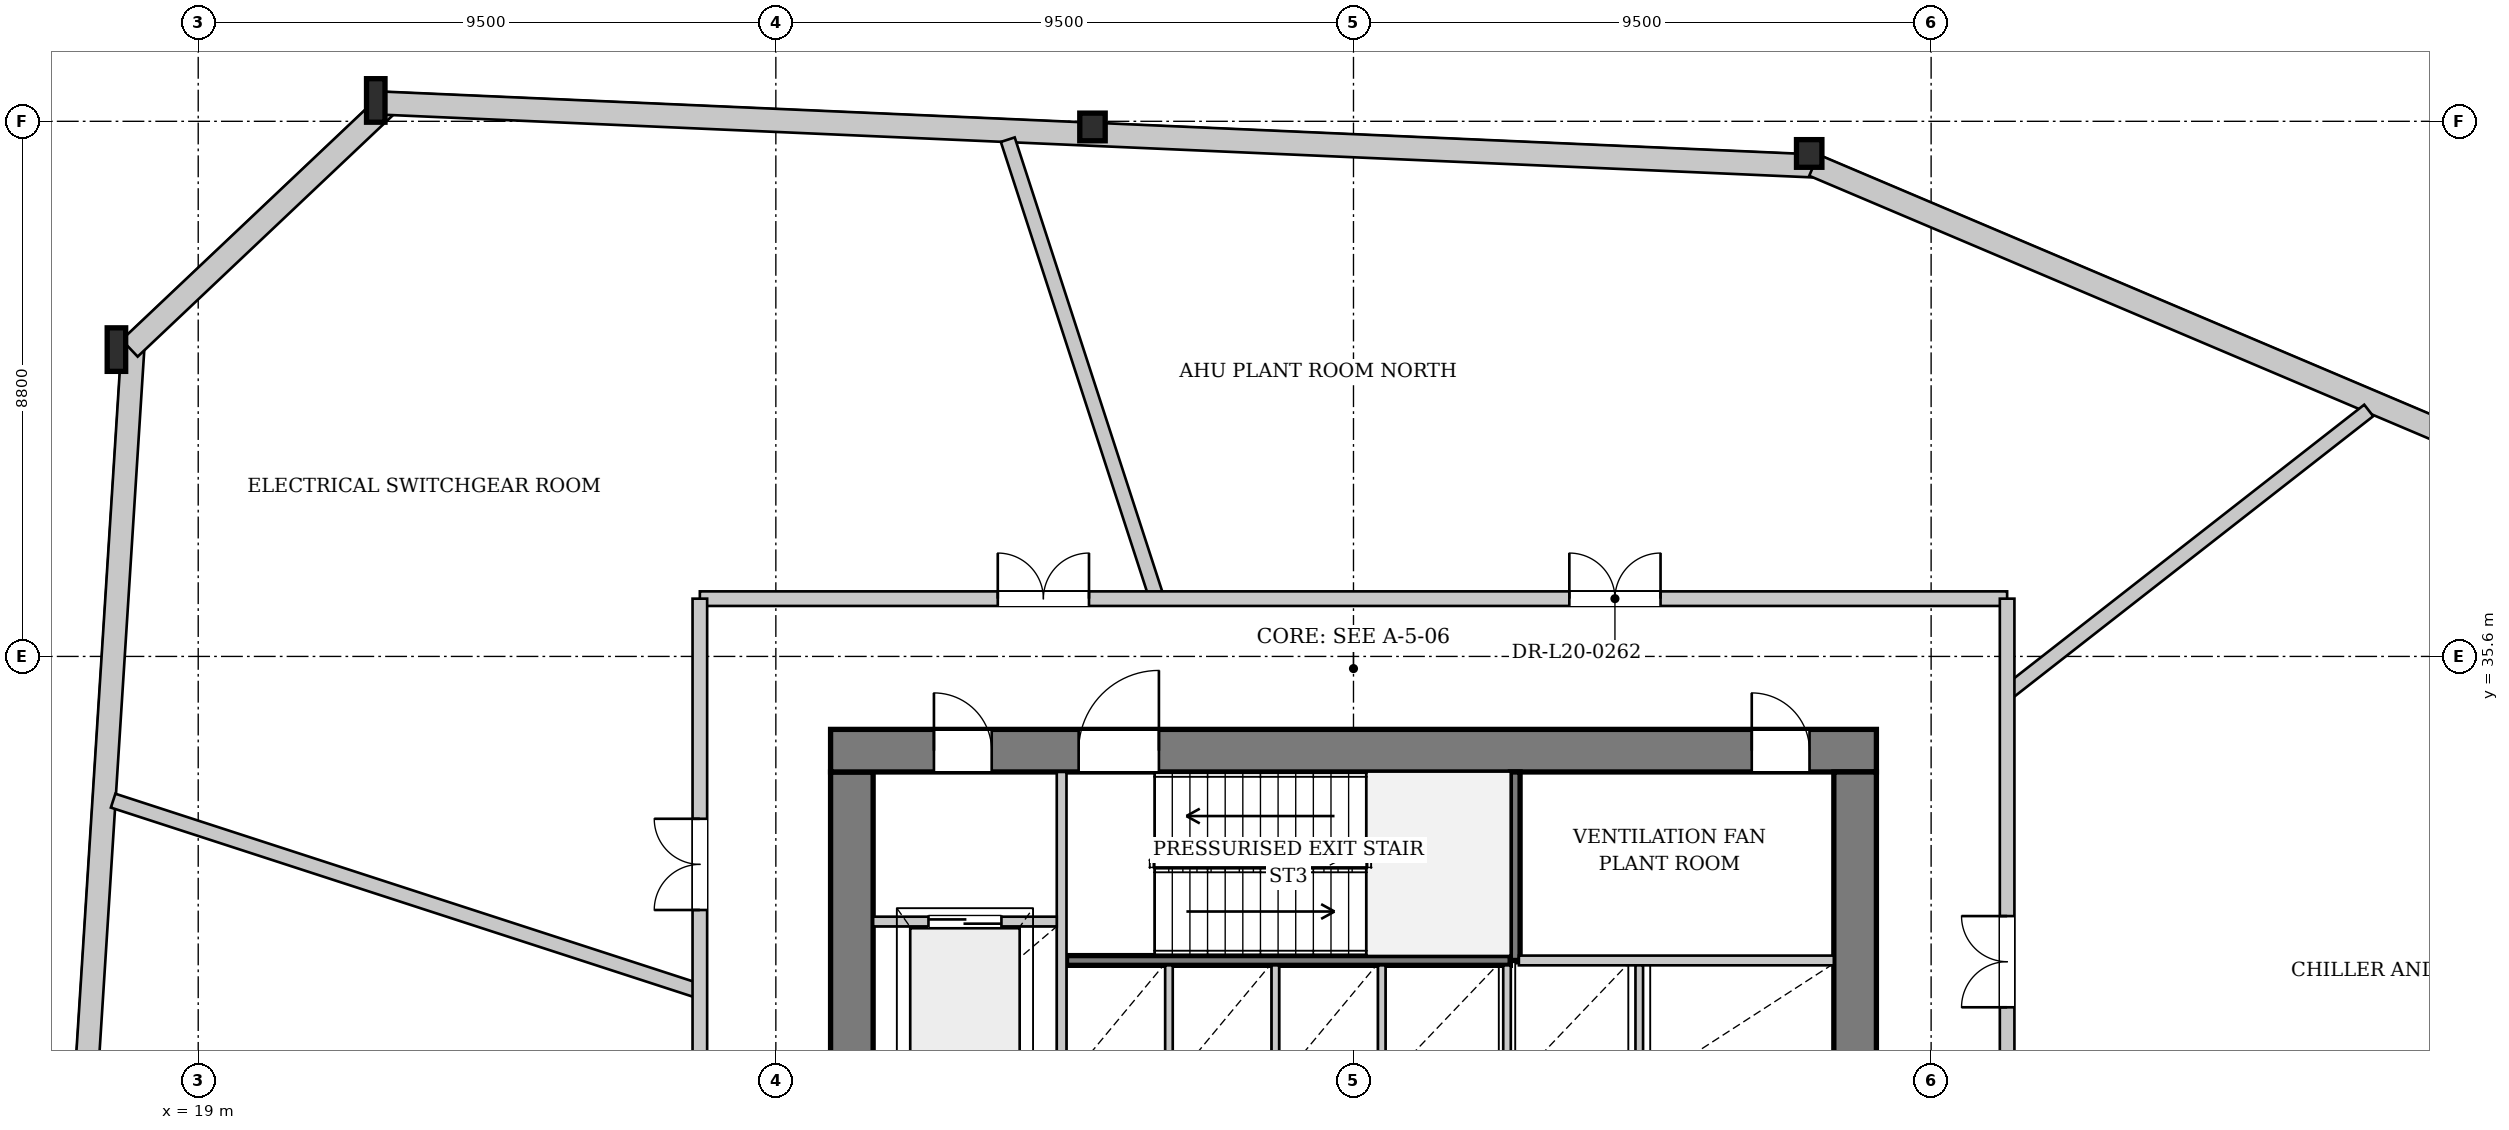
"""IFC4 building model, lengths in metres.
Left out: names, types, materials, properties, quantities, classifications, styles, units other than length and angle.
Written with IfcOpenShell. Run it as: python <this file> out.ifc"""

import sys

from ifc_helpers import new_model, si_unit, direction, frame, frame_2d, origin, origin_2d, place, context, subcontext, project, spatial, rectangle, i_section, extrude, source, transform, mapped, element, fill, save


model = new_model("IFC4")
c1 = context("Model", 3, precision=1e-05, world=origin(), true_north=direction((0.0, 1.0)))
c2 = subcontext(c1, "Body", "Model", "MODEL_VIEW")
j1 = project(units=[si_unit("LENGTHUNIT", "METRE"), si_unit("PLANEANGLEUNIT", "RADIAN")], contexts=[c1])
p1 = place(None, origin())
s1 = spatial("IfcSite", under=j1, at=p1, CompositionType="ELEMENT")
p2 = place(p1, origin())
s2 = spatial("IfcBuilding", under=s1, at=p2, CompositionType="ELEMENT")
p3 = place(p2, frame((0.0, 0.0, 79.9)))
s3 = spatial("IfcBuildingStorey", under=s2, at=p3, CompositionType="ELEMENT", Elevation=79.9)
m1 = source(origin(), c2, "Body", "SweptSolid", [
    extrude(i_section(OverallWidth=0.418, OverallDepth=0.455, WebThickness=0.038, FlangeThickness=0.059, at=origin_2d()), origin(), (0.0, 0.0, 1.0), 4.346),
])
p4 = place(p3, frame((45.644, 43.854, 0.0), z_axis=(-0.068709156134, 0.008202401305, 0.997603013466), x_axis=(-0.118536916042, -0.992949646022, 0.0)))
e1 = element("IfcColumn", 1, at=p4, inside=s3, PredefinedType="COLUMN", context=c2, shape_type="MappedRepresentation", body=[
    mapped(m1, transform((0.0, 0.0, 0.0), x_axis=(1.0, 0.0, 0.0), y_axis=(0.0, 1.0, 0.0), z_axis=(0.0, 0.0, 1.0), scale=1.0)),
])
m2 = source(origin(), c2, "Body", "SweptSolid", [
    extrude(i_section(OverallWidth=0.418, OverallDepth=0.455, WebThickness=0.038, FlangeThickness=0.059, at=origin_2d()), origin(), (0.0, 0.0, 1.0), 4.347),
])
p5 = place(p3, frame((33.852, 44.371, 0.0), z_axis=(-0.066389650147, -0.029375454338, 0.997361267062), x_axis=(0.40463044946, -0.914480289219, 0.0)))
e2 = element("IfcColumn", 2, at=p5, inside=s3, PredefinedType="COLUMN", context=c2, shape_type="MappedRepresentation", body=[
    mapped(m2, transform((0.0, 0.0, 0.0), x_axis=(1.0, 0.0, 0.0), y_axis=(0.0, 1.0, 0.0), z_axis=(0.0, 0.0, 1.0), scale=1.0)),
])
m3 = source(origin(), c2, "Body", "SweptSolid", [
    extrude(i_section(OverallWidth=0.304, OverallDepth=0.716, WebThickness=0.021, FlangeThickness=0.04, at=origin_2d()), origin(), (0.0, 0.0, 1.0), 4.354),
])
p6 = place(p3, frame((22.059, 44.888, 0.0), z_axis=(-0.06398118245, -0.066728840592, 0.99571766587), x_axis=(0.721811427095, -0.692089780097, 0.0)))
e3 = element("IfcColumn", 3, at=p6, inside=s3, PredefinedType="COLUMN", context=c2, shape_type="MappedRepresentation", body=[
    mapped(m3, transform((0.0, 0.0, 0.0), x_axis=(1.0, 0.0, 0.0), y_axis=(0.0, 1.0, 0.0), z_axis=(0.0, 0.0, 1.0), scale=1.0)),
])
m4 = source(origin(), c2, "Body", "SweptSolid", [
    extrude(i_section(OverallWidth=0.304, OverallDepth=0.716, WebThickness=0.021, FlangeThickness=0.04, at=origin_2d()), origin(), (0.0, 0.0, 1.0), 4.351),
])
p7 = place(p3, frame((17.743, 40.806, 0.0), z_axis=(-0.040459833121, -0.073736783246, 0.996456666745), x_axis=(0.876694422184, -0.481047700453, 0.0)))
e4 = element("IfcColumn", 4, at=p7, inside=s3, PredefinedType="COLUMN", context=c2, shape_type="MappedRepresentation", body=[
    mapped(m4, transform((0.0, 0.0, 0.0), x_axis=(1.0, 0.0, 0.0), y_axis=(0.0, 1.0, 0.0), z_axis=(0.0, 0.0, 1.0), scale=1.0)),
])
p8 = place(p3, frame((16.764, 22.462, 0.0), z_axis=(0.0, 0.0, 1.0), x_axis=(0.063622704695, 0.997974023433, 0.0)))
e5 = element("IfcWall", 5, at=p8, inside=s3, PredefinedType="SOLIDWALL", context=c2, shape_type="SweptSolid", body=[
    extrude(rectangle(XDim=18.369, YDim=0.38, at=frame_2d((9.185, 0.0))), origin(), (0.0, 0.0, 1.0), 3.642),
])
p9 = place(p3, frame((17.874, 40.668, 0.0), z_axis=(0.0, 0.0, 1.0), x_axis=(0.726536612443, 0.687127754336, 0.0)))
e6 = element("IfcWall", 6, at=p9, inside=s3, PredefinedType="SOLIDWALL", context=c2, shape_type="SweptSolid", body=[
    extrude(rectangle(XDim=5.941, YDim=0.38, at=frame_2d((2.971, 0.0))), origin(), (0.0, 0.0, 1.0), 3.642),
])
p10 = place(p3, frame((22.051, 44.698, 0.0), z_axis=(0.0, 0.0, 1.0), x_axis=(0.999039086375, -0.043828117637, 0.0)))
e7 = element("IfcWall", 7, at=p10, inside=s3, PredefinedType="SOLIDWALL", context=c2, shape_type="SweptSolid", body=[
    extrude(rectangle(XDim=23.607, YDim=0.38, at=frame_2d((11.804, 0.0))), origin(), (0.0, 0.0, 1.0), 3.642),
])
p11 = place(p3, frame((45.57, 43.679, 0.0), z_axis=(0.0, 0.0, 1.0), x_axis=(0.920635630861, -0.390422892758, 0.0)))
e8 = element("IfcWall", 8, at=p11, inside=s3, PredefinedType="SOLIDWALL", context=c2, shape_type="SweptSolid", body=[
    extrude(rectangle(XDim=23.607, YDim=0.38, at=frame_2d((11.804, 0.0))), origin(), (0.0, 0.0, 1.0), 3.642),
])
p12 = place(p3, frame((68.059, 30.563, 0.0), z_axis=(0.0, 0.0, 1.0), x_axis=(-0.711738982303, -0.70244403412, 0.0)))
e9 = element("IfcWall", 9, at=p12, inside=s3, PredefinedType="SOLIDWALL", context=c2, shape_type="SweptSolid", body=[
    extrude(rectangle(XDim=24.217, YDim=0.38, at=frame_2d((12.109, 0.0))), origin(), (0.0, 0.0, 1.0), 3.642),
])
p13 = place(p3, frame((29.75, 19.5, 0.0), z_axis=(0.0, 0.0, 1.0), x_axis=(0.0, 1.0, 0.0)))
e10 = element("IfcWall", 10, at=p13, inside=s3, PredefinedType="SHEAR", context=c2, shape_type="SweptSolid", body=[
    extrude(rectangle(XDim=14.2, YDim=0.7, at=frame_2d((7.1, 0.0))), origin(), (0.0, 0.0, 1.0), 4.25),
])
p14 = place(p13, frame((7.42, 0.0, 0.0)))
e11 = element("IfcOpeningElement", 11, at=p14, cuts=e10, PredefinedType="OPENING", context=c2, shape_type="SweptSolid", body=[
    extrude(rectangle(XDim=1.6, YDim=2.2, at=frame_2d((0.8, 1.1))), frame((0.0, 0.36, 0.0), z_axis=(0.0, -1.0, 0.0), x_axis=(1.0, 0.0, 0.0)), (0.0, 0.0, 1.0), 0.72),
])
p15 = place(p3, frame((29.4, 34.05, 0.0), z_axis=(0.0, 0.0, 1.0), x_axis=(1.0, 0.0, 0.0)))
e12 = element("IfcWall", 12, at=p15, inside=s3, PredefinedType="SHEAR", context=c2, shape_type="SweptSolid", body=[
    extrude(rectangle(XDim=17.2, YDim=0.7, at=frame_2d((8.6, 0.0))), origin(), (0.0, 0.0, 1.0), 4.25),
])
p16 = place(p15, frame((1.7, 0.0, 0.0)))
e13 = element("IfcOpeningElement", 13, at=p16, cuts=e12, PredefinedType="OPENING", context=c2, shape_type="SweptSolid", body=[
    extrude(rectangle(XDim=0.95, YDim=2.1, at=frame_2d((0.475, 1.05))), frame((0.0, 0.36, 0.0), z_axis=(0.0, -1.0, 0.0), x_axis=(1.0, 0.0, 0.0)), (0.0, 0.0, 1.0), 0.72),
])
p17 = place(p15, frame((4.08, 0.0, 0.0)))
e14 = element("IfcOpeningElement", 14, at=p17, cuts=e12, PredefinedType="OPENING", context=c2, shape_type="SweptSolid", body=[
    extrude(rectangle(XDim=1.32, YDim=2.2, at=frame_2d((0.66, 1.1))), frame((0.0, 0.36, 0.0), z_axis=(0.0, -1.0, 0.0), x_axis=(1.0, 0.0, 0.0)), (0.0, 0.0, 1.0), 0.72),
])
p18 = place(p15, frame((15.15, 0.0, 0.0)))
e15 = element("IfcOpeningElement", 15, at=p18, cuts=e12, PredefinedType="OPENING", context=c2, shape_type="SweptSolid", body=[
    extrude(rectangle(XDim=0.95, YDim=2.1, at=frame_2d((0.475, 1.05))), frame((0.0, 0.36, 0.0), z_axis=(0.0, -1.0, 0.0), x_axis=(1.0, 0.0, 0.0)), (0.0, 0.0, 1.0), 0.72),
])
p19 = place(p3, frame((46.25, 33.7, 0.0), z_axis=(0.0, 0.0, 1.0), x_axis=(0.0, -1.0, 0.0)))
e16 = element("IfcWall", 16, at=p19, inside=s3, PredefinedType="SHEAR", context=c2, shape_type="SweptSolid", body=[
    extrude(rectangle(XDim=14.2, YDim=0.7, at=frame_2d((7.1, 0.0))), origin(), (0.0, 0.0, 1.0), 4.25),
])
p20 = place(p19, frame((5.18, 0.0, 0.0)))
e17 = element("IfcOpeningElement", 17, at=p20, cuts=e16, PredefinedType="OPENING", context=c2, shape_type="SweptSolid", body=[
    extrude(rectangle(XDim=1.6, YDim=2.2, at=frame_2d((0.8, 1.1))), frame((0.0, 0.36, 0.0), z_axis=(0.0, -1.0, 0.0), x_axis=(1.0, 0.0, 0.0)), (0.0, 0.0, 1.0), 0.72),
])
p21 = place(p3, frame((33.28, 30.6, 0.0), z_axis=(0.0, 0.0, 1.0), x_axis=(1.0, 0.0, 0.0)))
e18 = element("IfcWall", 18, at=p21, inside=s3, PredefinedType="PARTITIONING", context=c2, shape_type="SweptSolid", body=[
    extrude(rectangle(XDim=7.3, YDim=0.16, at=frame_2d((3.65, 0.0))), origin(), (0.0, 0.0, 1.0), 4.25),
])
p22 = place(p3, frame((40.66, 30.6, 0.0), z_axis=(0.0, 0.0, 1.0), x_axis=(0.0, 1.0, 0.0)))
e19 = element("IfcWall", 19, at=p22, inside=s3, PredefinedType="PARTITIONING", context=c2, shape_type="SweptSolid", body=[
    extrude(rectangle(XDim=3.1, YDim=0.16, at=frame_2d((1.55, 0.0))), origin(), (0.0, 0.0, 1.0), 4.25),
])
p23 = place(p3, frame((33.2, 28.44, 0.0), z_axis=(0.0, 0.0, 1.0), x_axis=(0.0, 1.0, 0.0)))
e20 = element("IfcWall", 20, at=p23, inside=s3, PredefinedType="PARTITIONING", context=c2, shape_type="SweptSolid", body=[
    extrude(rectangle(XDim=5.26, YDim=0.16, at=frame_2d((2.63, 0.0))), origin(), (0.0, 0.0, 1.0), 4.25),
])
p24 = place(p3, frame((30.1, 31.24, 0.0), z_axis=(0.0, 0.0, 1.0), x_axis=(1.0, 0.0, 0.0)))
e21 = element("IfcWall", 21, at=p24, inside=s3, PredefinedType="PARTITIONING", context=c2, shape_type="SweptSolid", body=[
    extrude(rectangle(XDim=3.02, YDim=0.16, at=frame_2d((1.51, 0.0))), origin(), (0.0, 0.0, 1.0), 4.25),
])
p25 = place(p24, frame((0.91, 0.0, 0.0)))
e22 = element("IfcOpeningElement", 22, at=p25, cuts=e21, PredefinedType="OPENING", context=c2, shape_type="SweptSolid", body=[
    extrude(rectangle(XDim=1.2, YDim=2.2, at=frame_2d((0.6, 1.1))), frame((0.0, 0.09, 0.0), z_axis=(0.0, -1.0, 0.0), x_axis=(1.0, 0.0, 0.0)), (0.0, 0.0, 1.0), 0.18),
])
p26 = place(p3, frame((40.72, 30.6, 0.0), z_axis=(0.0, 0.0, 1.0), x_axis=(1.0, 0.0, 0.0)))
e23 = element("IfcWall", 23, at=p26, inside=s3, PredefinedType="PARTITIONING", context=c2, shape_type="SweptSolid", body=[
    extrude(rectangle(XDim=5.18, YDim=0.16, at=frame_2d((2.59, 0.0))), origin(), (0.0, 0.0, 1.0), 4.25),
])
for number, where, z_axis, x_axis in (
    (24, (34.965, 28.6, 0.0), (0.0, 0.0, 1.0), (0.0, 1.0, 0.0)),
    (25, (36.715, 28.6, 0.0), (0.0, 0.0, 1.0), (0.0, 1.0, 0.0)),
    (26, (38.465, 28.6, 0.0), (0.0, 0.0, 1.0), (0.0, 1.0, 0.0)),
    (27, (40.525, 28.6, 0.0), (0.0, 0.0, 1.0), (0.0, 1.0, 0.0)),
    (28, (42.7, 28.6, 0.0), (0.0, 0.0, 1.0), (0.0, 1.0, 0.0)),
):
    element("IfcWall", number, at=place(p3, frame(where, z_axis=z_axis, x_axis=x_axis)), inside=s3, PredefinedType="PARTITIONING", context=c2, shape_type="SweptSolid", body=[
        extrude(rectangle(XDim=1.92, YDim=0.125, at=frame_2d((0.96, 0.0))), origin(), (0.0, 0.0, 1.0), 4.25),
    ])
p27 = place(p3, frame((48.75, 34.999, 0.0), z_axis=(0.0, 0.0, 1.0), x_axis=(0.788016035998, 0.615654714113, 0.0)))
e29 = element("IfcWall", 29, at=p27, inside=s3, PredefinedType="PARTITIONING", context=c2, shape_type="SweptSolid", body=[
    extrude(rectangle(XDim=7.547, YDim=0.24, at=frame_2d((3.773, 0.0))), origin(), (0.0, 0.0, 1.0), 4.25),
])
p28 = place(p3, frame((34.767, 36.55, 0.0), z_axis=(0.0, 0.0, 1.0), x_axis=(-0.309029730832, 0.951052377875, 0.0)))
e30 = element("IfcWall", 30, at=p28, inside=s3, PredefinedType="PARTITIONING", context=c2, shape_type="SweptSolid", body=[
    extrude(rectangle(XDim=7.937, YDim=0.24, at=frame_2d((3.968, 0.0))), origin(), (0.0, 0.0, 1.0), 4.25),
])
p29 = place(p3, frame((27.25, 30.093, 0.0), z_axis=(0.0, 0.0, 1.0), x_axis=(-0.95105740787, 0.309014250376, 0.0)))
e31 = element("IfcWall", 31, at=p29, inside=s3, PredefinedType="PARTITIONING", context=c2, shape_type="SweptSolid", body=[
    extrude(rectangle(XDim=10.146, YDim=0.24, at=frame_2d((5.073, 0.0))), origin(), (0.0, 0.0, 1.0), 4.25),
])
p30 = place(p3, frame((27.25, 36.55, 0.0), z_axis=(0.0, 0.0, 1.0), x_axis=(1.0, 0.0, 0.0)))
e32 = element("IfcWall", 32, at=p30, inside=s3, PredefinedType="PARTITIONING", context=c2, shape_type="SweptSolid", body=[
    extrude(rectangle(XDim=21.5, YDim=0.24, at=frame_2d((10.75, 0.0))), origin(), (0.0, 0.0, 1.0), 4.25),
])
p31 = place(p30, frame((4.9, 0.0, 0.0)))
e33 = element("IfcOpeningElement", 33, at=p31, cuts=e32, PredefinedType="OPENING", context=c2, shape_type="SweptSolid", body=[
    extrude(rectangle(XDim=1.5, YDim=2.25, at=frame_2d((0.75, 1.125))), frame((0.0, 0.13, 0.0), z_axis=(0.0, -1.0, 0.0), x_axis=(1.0, 0.0, 0.0)), (0.0, 0.0, 1.0), 0.26),
])
p32 = place(p30, frame((14.3, 0.0, 0.0)))
e34 = element("IfcOpeningElement", 34, at=p32, cuts=e32, PredefinedType="OPENING", context=c2, shape_type="SweptSolid", body=[
    extrude(rectangle(XDim=1.5, YDim=2.25, at=frame_2d((0.75, 1.125))), frame((0.0, 0.13, 0.0), z_axis=(0.0, -1.0, 0.0), x_axis=(1.0, 0.0, 0.0)), (0.0, 0.0, 1.0), 0.26),
])
p33 = place(p3, frame((27.25, 16.65, 0.0), z_axis=(0.0, 0.0, 1.0), x_axis=(0.0, 1.0, 0.0)))
e35 = element("IfcWall", 35, at=p33, inside=s3, PredefinedType="PARTITIONING", context=c2, shape_type="SweptSolid", body=[
    extrude(rectangle(XDim=19.9, YDim=0.24, at=frame_2d((9.95, 0.0))), origin(), (0.0, 0.0, 1.0), 4.25),
])
p34 = place(p33, frame((5.22, 0.0, 0.0)))
e36 = element("IfcOpeningElement", 36, at=p34, cuts=e35, PredefinedType="OPENING", context=c2, shape_type="SweptSolid", body=[
    extrude(rectangle(XDim=1.5, YDim=2.25, at=frame_2d((0.75, 1.125))), frame((0.0, 0.13, 0.0), z_axis=(0.0, -1.0, 0.0), x_axis=(1.0, 0.0, 0.0)), (0.0, 0.0, 1.0), 0.26),
])
p35 = place(p33, frame((14.78, 0.0, 0.0)))
e37 = element("IfcOpeningElement", 37, at=p35, cuts=e35, PredefinedType="OPENING", context=c2, shape_type="SweptSolid", body=[
    extrude(rectangle(XDim=1.5, YDim=2.25, at=frame_2d((0.75, 1.125))), frame((0.0, 0.13, 0.0), z_axis=(0.0, -1.0, 0.0), x_axis=(1.0, 0.0, 0.0)), (0.0, 0.0, 1.0), 0.26),
])
p36 = place(p3, frame((48.75, 16.65, 0.0), z_axis=(0.0, 0.0, 1.0), x_axis=(0.0, 1.0, 0.0)))
e38 = element("IfcWall", 38, at=p36, inside=s3, PredefinedType="PARTITIONING", context=c2, shape_type="SweptSolid", body=[
    extrude(rectangle(XDim=19.9, YDim=0.24, at=frame_2d((9.95, 0.0))), origin(), (0.0, 0.0, 1.0), 4.25),
])
p37 = place(p36, frame((5.22, 0.0, 0.0)))
e39 = element("IfcOpeningElement", 39, at=p37, cuts=e38, PredefinedType="OPENING", context=c2, shape_type="SweptSolid", body=[
    extrude(rectangle(XDim=1.5, YDim=2.25, at=frame_2d((0.75, 1.125))), frame((0.0, 0.13, 0.0), z_axis=(0.0, -1.0, 0.0), x_axis=(1.0, 0.0, 0.0)), (0.0, 0.0, 1.0), 0.26),
])
p38 = place(p36, frame((13.18, 0.0, 0.0)))
e40 = element("IfcOpeningElement", 40, at=p38, cuts=e38, PredefinedType="OPENING", context=c2, shape_type="SweptSolid", body=[
    extrude(rectangle(XDim=1.5, YDim=2.25, at=frame_2d((0.75, 1.125))), frame((0.0, 0.13, 0.0), z_axis=(0.0, -1.0, 0.0), x_axis=(1.0, 0.0, 0.0)), (0.0, 0.0, 1.0), 0.26),
])
m5 = source(origin(), c2, "Body", "SweptSolid", [
    extrude(rectangle(XDim=0.95, YDim=2.1, at=frame_2d((0.475, 1.05))), frame((0.0, 0.025, 0.0), z_axis=(0.0, -1.0, 0.0), x_axis=(1.0, 0.0, 0.0)), (0.0, 0.0, 1.0), 0.05),
])
p39 = place(p16, origin())
e41 = element("IfcDoor", 41, at=p39, inside=s3, OperationType="SINGLE_SWING_LEFT", PredefinedType="DOOR", context=c2, shape_type="MappedRepresentation", body=[
    mapped(m5, transform((0.0, 0.0, 0.0), x_axis=(1.0, 0.0, 0.0), y_axis=(0.0, 1.0, 0.0), z_axis=(0.0, 0.0, 1.0), scale=1.0)),
])
fill(e13, e41)
m6 = source(origin(), c2, "Body", "SweptSolid", [
    extrude(rectangle(XDim=1.32, YDim=2.2, at=frame_2d((0.66, 1.1))), frame((0.0, 0.025, 0.0), z_axis=(0.0, -1.0, 0.0), x_axis=(1.0, 0.0, 0.0)), (0.0, 0.0, 1.0), 0.05),
])
p40 = place(p17, origin())
e42 = element("IfcDoor", 42, at=p40, inside=s3, OperationType="SINGLE_SWING_RIGHT", PredefinedType="DOOR", context=c2, shape_type="MappedRepresentation", body=[
    mapped(m6, transform((0.0, 0.0, 0.0), x_axis=(1.0, 0.0, 0.0), y_axis=(0.0, 1.0, 0.0), z_axis=(0.0, 0.0, 1.0), scale=1.0)),
])
fill(e14, e42)
m7 = source(origin(), c2, "Body", "SweptSolid", [
    extrude(rectangle(XDim=1.2, YDim=2.2, at=frame_2d((0.6, 1.1))), frame((0.0, 0.025, 0.0), z_axis=(0.0, -1.0, 0.0), x_axis=(1.0, 0.0, 0.0)), (0.0, 0.0, 1.0), 0.05),
])
p41 = place(p25, origin())
e43 = element("IfcDoor", 43, at=p41, inside=s3, OperationType="DOUBLE_DOOR_SLIDING", PredefinedType="DOOR", context=c2, shape_type="MappedRepresentation", body=[
    mapped(m7, transform((0.0, 0.0, 0.0), x_axis=(1.0, 0.0, 0.0), y_axis=(0.0, 1.0, 0.0), z_axis=(0.0, 0.0, 1.0), scale=1.0)),
])
fill(e22, e43)
p42 = place(p18, origin())
e44 = element("IfcDoor", 44, at=p42, inside=s3, OperationType="SINGLE_SWING_LEFT", PredefinedType="DOOR", context=c2, shape_type="MappedRepresentation", body=[
    mapped(m5, transform((0.0, 0.0, 0.0), x_axis=(1.0, 0.0, 0.0), y_axis=(0.0, 1.0, 0.0), z_axis=(0.0, 0.0, 1.0), scale=1.0)),
])
fill(e15, e44)
m8 = source(origin(), c2, "Body", "SweptSolid", [
    extrude(rectangle(XDim=1.5, YDim=2.25, at=frame_2d((0.75, 1.125))), frame((0.0, 0.025, 0.0), z_axis=(0.0, -1.0, 0.0), x_axis=(1.0, 0.0, 0.0)), (0.0, 0.0, 1.0), 0.05),
])
p43 = place(p31, origin())
e45 = element("IfcDoor", 45, at=p43, inside=s3, OperationType="DOUBLE_DOOR_SINGLE_SWING", PredefinedType="DOOR", context=c2, shape_type="MappedRepresentation", body=[
    mapped(m8, transform((0.0, 0.0, 0.0), x_axis=(1.0, 0.0, 0.0), y_axis=(0.0, 1.0, 0.0), z_axis=(0.0, 0.0, 1.0), scale=1.0)),
])
fill(e33, e45)
p44 = place(p32, origin())
e46 = element("IfcDoor", 46, at=p44, inside=s3, OperationType="DOUBLE_DOOR_SINGLE_SWING", PredefinedType="DOOR", context=c2, shape_type="MappedRepresentation", body=[
    mapped(m8, transform((0.0, 0.0, 0.0), x_axis=(1.0, 0.0, 0.0), y_axis=(0.0, 1.0, 0.0), z_axis=(0.0, 0.0, 1.0), scale=1.0)),
])
fill(e34, e46)
p45 = place(p35, origin())
e47 = element("IfcDoor", 47, at=p45, inside=s3, OperationType="DOUBLE_DOOR_SINGLE_SWING", PredefinedType="DOOR", context=c2, shape_type="MappedRepresentation", body=[
    mapped(m8, transform((0.0, 0.0, 0.0), x_axis=(1.0, 0.0, 0.0), y_axis=(0.0, 1.0, 0.0), z_axis=(0.0, 0.0, 1.0), scale=1.0)),
])
fill(e37, e47)
p46 = place(p38, origin())
e48 = element("IfcDoor", 48, at=p46, inside=s3, OperationType="DOUBLE_DOOR_SINGLE_SWING", PredefinedType="DOOR", context=c2, shape_type="MappedRepresentation", body=[
    mapped(m8, transform((0.0, 0.0, 0.0), x_axis=(1.0, 0.0, 0.0), y_axis=(0.0, 1.0, 0.0), z_axis=(0.0, 0.0, 1.0), scale=1.0)),
])
fill(e40, e48)
save(model, sys.argv[1])
